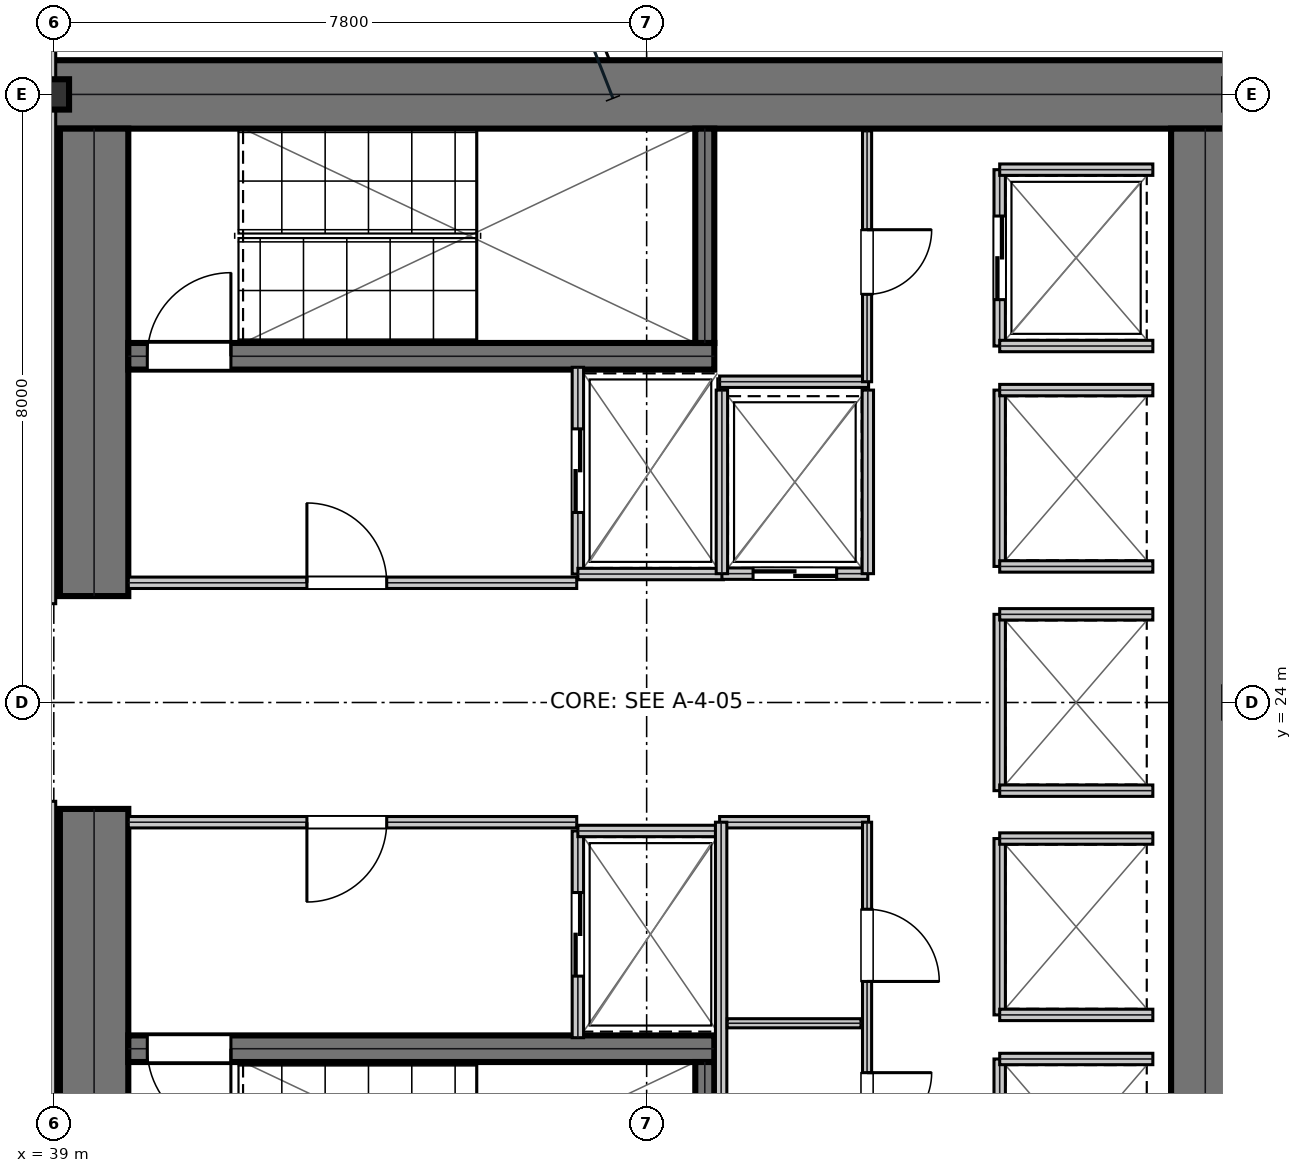
"""IFC4 building model, lengths in metres.
Left out: names, types, materials, properties, quantities, classifications, styles, units other than length and angle.
Written with IfcOpenShell. Run it as: python <this file> out.ifc"""

import sys

from ifc_helpers import new_model, si_unit, direction, frame, frame_2d, origin, origin_2d, place, context, subcontext, project, spatial, rectangle, i_section, extrude, element, fill, save


model = new_model("IFC4")
c1 = context("Model", 3, precision=1e-05, world=origin(), true_north=direction((0.0, 1.0)))
c2 = subcontext(c1, "Body", "Model", "MODEL_VIEW")
j1 = project(units=[si_unit("LENGTHUNIT", "METRE"), si_unit("PLANEANGLEUNIT", "RADIAN")], contexts=[c1])
p1 = place(None, origin())
s1 = spatial("IfcSite", under=j1, at=p1, CompositionType="ELEMENT")
p2 = place(p1, origin())
s2 = spatial("IfcBuilding", under=s1, at=p2, CompositionType="ELEMENT")
p3 = place(p2, frame((0.0, 0.0, 54.0)))
s3 = spatial("IfcBuildingStorey", under=s2, at=p3, CompositionType="ELEMENT", Elevation=54.0)
p4 = place(p3, frame((38.8, 32.0, 0.0), z_axis=(0.0, 0.0, 1.0), x_axis=(1.0, 0.0, 0.0)))
e1 = element("IfcWall", 1, at=p4, inside=s3, PredefinedType="SHEAR", context=c2, shape_type="SweptSolid", body=[
    extrude(rectangle(XDim=16.0, YDim=0.9, at=frame_2d((8.0, 0.0))), origin(), (0.0, 0.0, 1.0), 3.81),
])
for number, where, z_axis, x_axis in (
    (2, (39.53, 16.45, 0.0), (0.0, 0.0, 1.0), (0.0, 1.0, 0.0)),
    (3, (39.53, 25.4, 0.0), (0.0, 0.0, 1.0), (0.0, 1.0, 0.0)),
):
    element("IfcWall", number, at=place(p3, frame(where, z_axis=z_axis, x_axis=x_axis)), inside=s3, PredefinedType="SHEAR", context=c2, shape_type="SweptSolid", body=[
        extrude(rectangle(XDim=6.15, YDim=0.9, at=frame_2d((3.075, 0.0))), origin(), (0.0, 0.0, 1.0), 3.81),
    ])
p5 = place(p3, frame((54.15, 16.45, 0.0), z_axis=(0.0, 0.0, 1.0), x_axis=(0.0, 1.0, 0.0)))
e4 = element("IfcWall", 4, at=p5, inside=s3, PredefinedType="SHEAR", context=c2, shape_type="SweptSolid", body=[
    extrude(rectangle(XDim=15.1, YDim=0.9, at=frame_2d((7.55, 0.0))), origin(), (0.0, 0.0, 1.0), 3.81),
])
p6 = place(p3, frame((39.98, 28.555, 0.0), z_axis=(0.0, 0.0, 1.0), x_axis=(1.0, 0.0, 0.0)))
e5 = element("IfcWall", 5, at=p6, inside=s3, PredefinedType="SHEAR", context=c2, shape_type="SweptSolid", body=[
    extrude(rectangle(XDim=7.71, YDim=0.35, at=frame_2d((3.855, 0.0))), origin(), (0.0, 0.0, 1.0), 3.81),
])
p7 = place(p6, frame((0.25, 0.0, 0.0)))
e6 = element("IfcOpeningElement", 6, at=p7, cuts=e5, PredefinedType="OPENING", context=c2, shape_type="SweptSolid", body=[
    extrude(rectangle(XDim=1.1, YDim=2.15, at=frame_2d((0.55, 1.075))), frame((0.0, 0.185, 0.0), z_axis=(0.0, -1.0, 0.0), x_axis=(1.0, 0.0, 0.0)), (0.0, 0.0, 1.0), 0.37),
])
p8 = place(p3, frame((39.98, 19.445, 0.0), z_axis=(0.0, 0.0, 1.0), x_axis=(1.0, 0.0, 0.0)))
e7 = element("IfcWall", 7, at=p8, inside=s3, PredefinedType="SHEAR", context=c2, shape_type="SweptSolid", body=[
    extrude(rectangle(XDim=7.71, YDim=0.35, at=frame_2d((3.855, 0.0))), origin(), (0.0, 0.0, 1.0), 3.81),
])
p9 = place(p8, frame((0.25, 0.0, 0.0)))
e8 = element("IfcOpeningElement", 8, at=p9, cuts=e7, PredefinedType="OPENING", context=c2, shape_type="SweptSolid", body=[
    extrude(rectangle(XDim=1.1, YDim=2.15, at=frame_2d((0.55, 1.075))), frame((0.0, 0.185, 0.0), z_axis=(0.0, -1.0, 0.0), x_axis=(1.0, 0.0, 0.0)), (0.0, 0.0, 1.0), 0.37),
])
for number, where, z_axis, x_axis in (
    (9, (47.565, 28.73, 0.0), (0.0, 0.0, 1.0), (0.0, 1.0, 0.0)),
    (10, (47.565, 16.45, 0.0), (0.0, 0.0, 1.0), (0.0, 1.0, 0.0)),
):
    element("IfcWall", number, at=place(p3, frame(where, z_axis=z_axis, x_axis=x_axis)), inside=s3, PredefinedType="SHEAR", context=c2, shape_type="SweptSolid", body=[
        extrude(rectangle(XDim=2.82, YDim=0.25, at=frame_2d((1.41, 0.0))), origin(), (0.0, 0.0, 1.0), 3.81),
    ])
p10 = place(p3, frame((39.0, 32.0, 0.0), z_axis=(0.0, 0.0, 1.0), x_axis=(1.0, 0.0, 0.0)))
e11 = element("IfcColumn", 11, at=p10, inside=s3, PredefinedType="COLUMN", context=c2, shape_type="SweptSolid", body=[
    extrude(i_section(OverallWidth=0.401, OverallDepth=0.399, WebThickness=0.025, FlangeThickness=0.04, at=origin_2d()), origin(), (0.0, 0.0, 1.0), 4.044),
])
p11 = place(p3, frame((39.98, 25.575, 0.0), z_axis=(0.0, 0.0, 1.0), x_axis=(1.0, 0.0, 0.0)))
e12 = element("IfcWall", 12, at=p11, inside=s3, PredefinedType="PARTITIONING", context=c2, shape_type="SweptSolid", body=[
    extrude(rectangle(XDim=5.9, YDim=0.15, at=frame_2d((2.95, 0.0))), origin(), (0.0, 0.0, 1.0), 3.81),
])
p12 = place(p11, frame((2.35, 0.0, 0.0)))
e13 = element("IfcOpeningElement", 13, at=p12, cuts=e12, PredefinedType="OPENING", context=c2, shape_type="SweptSolid", body=[
    extrude(rectangle(XDim=1.05, YDim=2.15, at=frame_2d((0.525, 1.075))), frame((0.0, 0.085, 0.0), z_axis=(0.0, -1.0, 0.0), x_axis=(1.0, 0.0, 0.0)), (0.0, 0.0, 1.0), 0.17),
])
p13 = place(p3, frame((39.98, 22.425, 0.0), z_axis=(0.0, 0.0, 1.0), x_axis=(1.0, 0.0, 0.0)))
e14 = element("IfcWall", 14, at=p13, inside=s3, PredefinedType="PARTITIONING", context=c2, shape_type="SweptSolid", body=[
    extrude(rectangle(XDim=5.9, YDim=0.15, at=frame_2d((2.95, 0.0))), origin(), (0.0, 0.0, 1.0), 3.81),
])
p14 = place(p13, frame((2.35, 0.0, 0.0)))
e15 = element("IfcOpeningElement", 15, at=p14, cuts=e14, PredefinedType="OPENING", context=c2, shape_type="SweptSolid", body=[
    extrude(rectangle(XDim=1.05, YDim=2.15, at=frame_2d((0.525, 1.075))), frame((0.0, 0.085, 0.0), z_axis=(0.0, -1.0, 0.0), x_axis=(1.0, 0.0, 0.0)), (0.0, 0.0, 1.0), 0.17),
])
p15 = place(p3, frame((45.895, 25.69, 0.0), z_axis=(0.0, 0.0, 1.0), x_axis=(0.0, 1.0, 0.0)))
e16 = element("IfcWall", 16, at=p15, inside=s3, PredefinedType="PARTITIONING", context=c2, shape_type="SweptSolid", body=[
    extrude(rectangle(XDim=2.72, YDim=0.15, at=frame_2d((1.36, 0.0))), origin(), (0.0, 0.0, 1.0), 3.81),
])
p16 = place(p15, frame((0.81, 0.0, 0.0)))
e17 = element("IfcOpeningElement", 17, at=p16, cuts=e16, PredefinedType="OPENING", context=c2, shape_type="SweptSolid", body=[
    extrude(rectangle(XDim=1.1, YDim=2.15, at=frame_2d((0.55, 1.075))), frame((0.0, 0.085, 0.0), z_axis=(0.0, -1.0, 0.0), x_axis=(1.0, 0.0, 0.0)), (0.0, 0.0, 1.0), 0.17),
])
p17 = place(p3, frame((45.895, 25.69, 0.0), z_axis=(0.0, 0.0, 1.0), x_axis=(1.0, 0.0, 0.0)))
e18 = element("IfcWall", 18, at=p17, inside=s3, PredefinedType="PARTITIONING", context=c2, shape_type="SweptSolid", body=[
    extrude(rectangle(XDim=1.915, YDim=0.15, at=frame_2d((0.958, 0.0))), origin(), (0.0, 0.0, 1.0), 3.81),
])
p18 = place(p3, frame((45.895, 19.59, 0.0), z_axis=(0.0, 0.0, 1.0), x_axis=(0.0, 1.0, 0.0)))
e19 = element("IfcWall", 19, at=p18, inside=s3, PredefinedType="PARTITIONING", context=c2, shape_type="SweptSolid", body=[
    extrude(rectangle(XDim=2.72, YDim=0.15, at=frame_2d((1.36, 0.0))), origin(), (0.0, 0.0, 1.0), 3.81),
])
p19 = place(p18, frame((0.81, 0.0, 0.0)))
e20 = element("IfcOpeningElement", 20, at=p19, cuts=e19, PredefinedType="OPENING", context=c2, shape_type="SweptSolid", body=[
    extrude(rectangle(XDim=1.1, YDim=2.15, at=frame_2d((0.55, 1.075))), frame((0.0, 0.085, 0.0), z_axis=(0.0, -1.0, 0.0), x_axis=(1.0, 0.0, 0.0)), (0.0, 0.0, 1.0), 0.17),
])
p20 = place(p3, frame((45.895, 22.31, 0.0), z_axis=(0.0, 0.0, 1.0), x_axis=(1.0, 0.0, 0.0)))
e21 = element("IfcWall", 21, at=p20, inside=s3, PredefinedType="PARTITIONING", context=c2, shape_type="SweptSolid", body=[
    extrude(rectangle(XDim=1.915, YDim=0.15, at=frame_2d((0.958, 0.0))), origin(), (0.0, 0.0, 1.0), 3.81),
])
p21 = place(p3, frame((47.79, 25.695, 0.0), z_axis=(0.0, 0.0, 1.0), x_axis=(1.0, 0.0, 0.0)))
e22 = element("IfcWall", 22, at=p21, inside=s3, PredefinedType="PARTITIONING", context=c2, shape_type="SweptSolid", body=[
    extrude(rectangle(XDim=1.92, YDim=0.15, at=frame_2d((0.96, 0.0))), origin(), (0.0, 0.0, 1.0), 3.81),
])
p22 = place(p21, frame((0.41, 0.0, 0.0)))
e23 = element("IfcOpeningElement", 23, at=p22, cuts=e22, PredefinedType="OPENING", context=c2, shape_type="SweptSolid", body=[
    extrude(rectangle(XDim=1.1, YDim=2.15, at=frame_2d((0.55, 1.075))), frame((0.0, 0.085, 0.0), z_axis=(0.0, -1.0, 0.0), x_axis=(1.0, 0.0, 0.0)), (0.0, 0.0, 1.0), 0.17),
])
for number, where, z_axis, x_axis in (
    (24, (47.79, 25.695, 0.0), (0.0, 0.0, 1.0), (0.0, 1.0, 0.0)),
    (25, (49.71, 25.695, 0.0), (0.0, 0.0, 1.0), (0.0, 1.0, 0.0)),
):
    element("IfcWall", number, at=place(p3, frame(where, z_axis=z_axis, x_axis=x_axis)), inside=s3, PredefinedType="PARTITIONING", context=c2, shape_type="SweptSolid", body=[
        extrude(rectangle(XDim=2.415, YDim=0.15, at=frame_2d((1.208, 0.0))), origin(), (0.0, 0.0, 1.0), 3.81),
    ])
p23 = place(p3, frame((51.445, 28.69, 0.0), z_axis=(0.0, 0.0, 1.0), x_axis=(0.0, 1.0, 0.0)))
e26 = element("IfcWall", 26, at=p23, inside=s3, PredefinedType="PARTITIONING", context=c2, shape_type="SweptSolid", body=[
    extrude(rectangle(XDim=2.32, YDim=0.15, at=frame_2d((1.16, 0.0))), origin(), (0.0, 0.0, 1.0), 3.81),
])
p24 = place(p23, frame((0.61, 0.0, 0.0)))
e27 = element("IfcOpeningElement", 27, at=p24, cuts=e26, PredefinedType="OPENING", context=c2, shape_type="SweptSolid", body=[
    extrude(rectangle(XDim=1.1, YDim=2.15, at=frame_2d((0.55, 1.075))), frame((0.0, 0.085, 0.0), z_axis=(0.0, -1.0, 0.0), x_axis=(1.0, 0.0, 0.0)), (0.0, 0.0, 1.0), 0.17),
])
for number, where, z_axis, x_axis in (
    (28, (51.445, 28.69, 0.0), (0.0, 0.0, 1.0), (1.0, 0.0, 0.0)),
    (29, (51.445, 31.01, 0.0), (0.0, 0.0, 1.0), (1.0, 0.0, 0.0)),
):
    element("IfcWall", number, at=place(p3, frame(where, z_axis=z_axis, x_axis=x_axis)), inside=s3, PredefinedType="PARTITIONING", context=c2, shape_type="SweptSolid", body=[
        extrude(rectangle(XDim=2.015, YDim=0.15, at=frame_2d((1.007, 0.0))), origin(), (0.0, 0.0, 1.0), 3.81),
    ])
p25 = place(p3, frame((51.445, 25.79, 0.0), z_axis=(0.0, 0.0, 1.0), x_axis=(0.0, 1.0, 0.0)))
e30 = element("IfcWall", 30, at=p25, inside=s3, PredefinedType="PARTITIONING", context=c2, shape_type="SweptSolid", body=[
    extrude(rectangle(XDim=2.32, YDim=0.15, at=frame_2d((1.16, 0.0))), origin(), (0.0, 0.0, 1.0), 3.81),
])
for number, where, z_axis, x_axis in (
    (31, (51.445, 25.79, 0.0), (0.0, 0.0, 1.0), (1.0, 0.0, 0.0)),
    (32, (51.445, 28.11, 0.0), (0.0, 0.0, 1.0), (1.0, 0.0, 0.0)),
):
    element("IfcWall", number, at=place(p3, frame(where, z_axis=z_axis, x_axis=x_axis)), inside=s3, PredefinedType="PARTITIONING", context=c2, shape_type="SweptSolid", body=[
        extrude(rectangle(XDim=2.015, YDim=0.15, at=frame_2d((1.007, 0.0))), origin(), (0.0, 0.0, 1.0), 3.81),
    ])
p26 = place(p3, frame((51.445, 19.89, 0.0), z_axis=(0.0, 0.0, 1.0), x_axis=(0.0, 1.0, 0.0)))
e33 = element("IfcWall", 33, at=p26, inside=s3, PredefinedType="PARTITIONING", context=c2, shape_type="SweptSolid", body=[
    extrude(rectangle(XDim=2.32, YDim=0.15, at=frame_2d((1.16, 0.0))), origin(), (0.0, 0.0, 1.0), 3.81),
])
for number, where, z_axis, x_axis in (
    (34, (51.445, 19.89, 0.0), (0.0, 0.0, 1.0), (1.0, 0.0, 0.0)),
    (35, (51.445, 22.21, 0.0), (0.0, 0.0, 1.0), (1.0, 0.0, 0.0)),
):
    element("IfcWall", number, at=place(p3, frame(where, z_axis=z_axis, x_axis=x_axis)), inside=s3, PredefinedType="PARTITIONING", context=c2, shape_type="SweptSolid", body=[
        extrude(rectangle(XDim=2.015, YDim=0.15, at=frame_2d((1.007, 0.0))), origin(), (0.0, 0.0, 1.0), 3.81),
    ])
p27 = place(p3, frame((51.445, 22.84, 0.0), z_axis=(0.0, 0.0, 1.0), x_axis=(0.0, 1.0, 0.0)))
e36 = element("IfcWall", 36, at=p27, inside=s3, PredefinedType="PARTITIONING", context=c2, shape_type="SweptSolid", body=[
    extrude(rectangle(XDim=2.32, YDim=0.15, at=frame_2d((1.16, 0.0))), origin(), (0.0, 0.0, 1.0), 3.81),
])
for number, where, z_axis, x_axis in (
    (37, (51.445, 22.84, 0.0), (0.0, 0.0, 1.0), (1.0, 0.0, 0.0)),
    (38, (51.445, 25.16, 0.0), (0.0, 0.0, 1.0), (1.0, 0.0, 0.0)),
):
    element("IfcWall", number, at=place(p3, frame(where, z_axis=z_axis, x_axis=x_axis)), inside=s3, PredefinedType="PARTITIONING", context=c2, shape_type="SweptSolid", body=[
        extrude(rectangle(XDim=2.015, YDim=0.15, at=frame_2d((1.007, 0.0))), origin(), (0.0, 0.0, 1.0), 3.81),
    ])
p28 = place(p3, frame((51.445, 16.99, 0.0), z_axis=(0.0, 0.0, 1.0), x_axis=(0.0, 1.0, 0.0)))
e39 = element("IfcWall", 39, at=p28, inside=s3, PredefinedType="PARTITIONING", context=c2, shape_type="SweptSolid", body=[
    extrude(rectangle(XDim=2.32, YDim=0.15, at=frame_2d((1.16, 0.0))), origin(), (0.0, 0.0, 1.0), 3.81),
])
p29 = place(p3, frame((51.445, 19.31, 0.0), z_axis=(0.0, 0.0, 1.0), x_axis=(1.0, 0.0, 0.0)))
e40 = element("IfcWall", 40, at=p29, inside=s3, PredefinedType="PARTITIONING", context=c2, shape_type="SweptSolid", body=[
    extrude(rectangle(XDim=2.015, YDim=0.15, at=frame_2d((1.007, 0.0))), origin(), (0.0, 0.0, 1.0), 3.81),
])
p30 = place(p3, frame((47.76, 22.425, 0.0), z_axis=(0.0, 0.0, 1.0), x_axis=(1.0, 0.0, 0.0)))
e41 = element("IfcWall", 41, at=p30, inside=s3, PredefinedType="PARTITIONING", context=c2, shape_type="SweptSolid", body=[
    extrude(rectangle(XDim=1.96, YDim=0.15, at=frame_2d((0.98, 0.0))), origin(), (0.0, 0.0, 1.0), 3.81),
])
p31 = place(p3, frame((47.78, 16.45, 0.0), z_axis=(0.0, 0.0, 1.0), x_axis=(0.0, 1.0, 0.0)))
e42 = element("IfcWall", 42, at=p31, inside=s3, PredefinedType="PARTITIONING", context=c2, shape_type="SweptSolid", body=[
    extrude(rectangle(XDim=5.975, YDim=0.15, at=frame_2d((2.988, 0.0))), origin(), (0.0, 0.0, 1.0), 3.81),
])
p32 = place(p3, frame((47.86, 19.78, 0.0), z_axis=(0.0, 0.0, 1.0), x_axis=(1.0, 0.0, 0.0)))
e43 = element("IfcWall", 43, at=p32, inside=s3, PredefinedType="PARTITIONING", context=c2, shape_type="SweptSolid", body=[
    extrude(rectangle(XDim=1.76, YDim=0.12, at=frame_2d((0.88, 0.0))), origin(), (0.0, 0.0, 1.0), 3.81),
])
p33 = place(p3, frame((49.7, 16.48, 0.0), z_axis=(0.0, 0.0, 1.0), x_axis=(0.0, 1.0, 0.0)))
e44 = element("IfcWall", 44, at=p33, inside=s3, PredefinedType="PARTITIONING", context=c2, shape_type="SweptSolid", body=[
    extrude(rectangle(XDim=5.945, YDim=0.12, at=frame_2d((2.973, 0.0))), origin(), (0.0, 0.0, 1.0), 3.81),
])
p34 = place(p33, frame((1.8, 0.0, 0.0)))
e45 = element("IfcOpeningElement", 45, at=p34, cuts=e44, PredefinedType="OPENING", context=c2, shape_type="SweptSolid", body=[
    extrude(rectangle(XDim=0.85, YDim=2.15, at=frame_2d((0.425, 1.075))), frame((0.0, 0.07, 0.0), z_axis=(0.0, -1.0, 0.0), x_axis=(1.0, 0.0, 0.0)), (0.0, 0.0, 1.0), 0.14),
])
p35 = place(p33, frame((3.85, 0.0, 0.0)))
e46 = element("IfcOpeningElement", 46, at=p35, cuts=e44, PredefinedType="OPENING", context=c2, shape_type="SweptSolid", body=[
    extrude(rectangle(XDim=0.95, YDim=2.15, at=frame_2d((0.475, 1.075))), frame((0.0, 0.07, 0.0), z_axis=(0.0, -1.0, 0.0), x_axis=(1.0, 0.0, 0.0)), (0.0, 0.0, 1.0), 0.14),
])
p36 = place(p3, frame((47.76, 28.22, 0.0), z_axis=(0.0, 0.0, 1.0), x_axis=(1.0, 0.0, 0.0)))
e47 = element("IfcWall", 47, at=p36, inside=s3, PredefinedType="PARTITIONING", context=c2, shape_type="SweptSolid", body=[
    extrude(rectangle(XDim=1.96, YDim=0.15, at=frame_2d((0.98, 0.0))), origin(), (0.0, 0.0, 1.0), 3.81),
])
p37 = place(p3, frame((49.7, 28.22, 0.0), z_axis=(0.0, 0.0, 1.0), x_axis=(0.0, 1.0, 0.0)))
e48 = element("IfcWall", 48, at=p37, inside=s3, PredefinedType="PARTITIONING", context=c2, shape_type="SweptSolid", body=[
    extrude(rectangle(XDim=3.3, YDim=0.12, at=frame_2d((1.65, 0.0))), origin(), (0.0, 0.0, 1.0), 3.81),
])
p38 = place(p37, frame((1.15, 0.0, 0.0)))
e49 = element("IfcOpeningElement", 49, at=p38, cuts=e48, PredefinedType="OPENING", context=c2, shape_type="SweptSolid", body=[
    extrude(rectangle(XDim=0.85, YDim=2.15, at=frame_2d((0.425, 1.075))), frame((0.0, 0.07, 0.0), z_axis=(0.0, -1.0, 0.0), x_axis=(1.0, 0.0, 0.0)), (0.0, 0.0, 1.0), 0.14),
])
for number, where, z_axis, x_axis in (
    (50, (38.95, 14.5, 0.0), (0.0, 0.0, 1.0), (0.0, 1.0, 0.0)),
    (51, (38.95, 25.3, 0.0), (0.0, 0.0, 1.0), (0.0, 1.0, 0.0)),
):
    element("IfcWall", number, at=place(p3, frame(where, z_axis=z_axis, x_axis=x_axis)), inside=s3, PredefinedType="PARTITIONING", context=c2, shape_type="SweptSolid", body=[
        extrude(rectangle(XDim=8.2, YDim=0.15, at=frame_2d((4.1, 0.0))), origin(), (0.0, 0.0, 1.0), 3.181),
    ])
p39 = place(p12, origin())
e52 = element("IfcDoor", 52, at=p39, inside=s3, OperationType="SINGLE_SWING_LEFT", PredefinedType="DOOR", context=c2, shape_type="SweptSolid", body=[
    extrude(rectangle(XDim=1.05, YDim=2.15, at=frame_2d((0.525, 1.075))), frame((0.0, 0.025, 0.0), z_axis=(0.0, -1.0, 0.0), x_axis=(1.0, 0.0, 0.0)), (0.0, 0.0, 1.0), 0.05),
])
fill(e13, e52)
p40 = place(p14, frame((1.05, 0.0, 0.0), z_axis=(0.0, 0.0, 1.0), x_axis=(-1.0, 0.0, 0.0)))
e53 = element("IfcDoor", 53, at=p40, inside=s3, OperationType="SINGLE_SWING_RIGHT", PredefinedType="DOOR", context=c2, shape_type="SweptSolid", body=[
    extrude(rectangle(XDim=1.05, YDim=2.15, at=frame_2d((0.525, 1.075))), frame((0.0, 0.025, 0.0), z_axis=(0.0, -1.0, 0.0), x_axis=(1.0, 0.0, 0.0)), (0.0, 0.0, 1.0), 0.05),
])
fill(e15, e53)
p41 = place(p16, frame((1.1, 0.0, 0.0), z_axis=(0.0, 0.0, 1.0), x_axis=(-1.0, 0.0, 0.0)))
e54 = element("IfcDoor", 54, at=p41, inside=s3, OperationType="DOUBLE_DOOR_SLIDING", PredefinedType="DOOR", context=c2, shape_type="SweptSolid", body=[
    extrude(rectangle(XDim=1.1, YDim=2.15, at=frame_2d((0.55, 1.075))), frame((0.0, 0.025, 0.0), z_axis=(0.0, -1.0, 0.0), x_axis=(1.0, 0.0, 0.0)), (0.0, 0.0, 1.0), 0.05),
])
fill(e17, e54)
p42 = place(p19, frame((1.1, 0.0, 0.0), z_axis=(0.0, 0.0, 1.0), x_axis=(-1.0, 0.0, 0.0)))
e55 = element("IfcDoor", 55, at=p42, inside=s3, OperationType="DOUBLE_DOOR_SLIDING", PredefinedType="DOOR", context=c2, shape_type="SweptSolid", body=[
    extrude(rectangle(XDim=1.1, YDim=2.15, at=frame_2d((0.55, 1.075))), frame((0.0, 0.025, 0.0), z_axis=(0.0, -1.0, 0.0), x_axis=(1.0, 0.0, 0.0)), (0.0, 0.0, 1.0), 0.05),
])
fill(e20, e55)
p43 = place(p22, frame((1.1, 0.0, 0.0), z_axis=(0.0, 0.0, 1.0), x_axis=(-1.0, 0.0, 0.0)))
e56 = element("IfcDoor", 56, at=p43, inside=s3, OperationType="DOUBLE_DOOR_SLIDING", PredefinedType="DOOR", context=c2, shape_type="SweptSolid", body=[
    extrude(rectangle(XDim=1.1, YDim=2.15, at=frame_2d((0.55, 1.075))), frame((0.0, 0.025, 0.0), z_axis=(0.0, -1.0, 0.0), x_axis=(1.0, 0.0, 0.0)), (0.0, 0.0, 1.0), 0.05),
])
fill(e23, e56)
p44 = place(p24, frame((1.1, 0.0, 0.0), z_axis=(0.0, 0.0, 1.0), x_axis=(-1.0, 0.0, 0.0)))
e57 = element("IfcDoor", 57, at=p44, inside=s3, OperationType="DOUBLE_DOOR_SLIDING", PredefinedType="DOOR", context=c2, shape_type="SweptSolid", body=[
    extrude(rectangle(XDim=1.1, YDim=2.15, at=frame_2d((0.55, 1.075))), frame((0.0, 0.025, 0.0), z_axis=(0.0, -1.0, 0.0), x_axis=(1.0, 0.0, 0.0)), (0.0, 0.0, 1.0), 0.05),
])
fill(e27, e57)
p45 = place(p34, frame((0.85, 0.0, 0.0), z_axis=(0.0, 0.0, 1.0), x_axis=(-1.0, 0.0, 0.0)))
e58 = element("IfcDoor", 58, at=p45, inside=s3, OperationType="SINGLE_SWING_LEFT", PredefinedType="DOOR", context=c2, shape_type="SweptSolid", body=[
    extrude(rectangle(XDim=0.85, YDim=2.15, at=frame_2d((0.425, 1.075))), frame((0.0, 0.025, 0.0), z_axis=(0.0, -1.0, 0.0), x_axis=(1.0, 0.0, 0.0)), (0.0, 0.0, 1.0), 0.05),
])
fill(e45, e58)
p46 = place(p35, frame((0.95, 0.0, 0.0), z_axis=(0.0, 0.0, 1.0), x_axis=(-1.0, 0.0, 0.0)))
e59 = element("IfcDoor", 59, at=p46, inside=s3, OperationType="SINGLE_SWING_RIGHT", PredefinedType="DOOR", context=c2, shape_type="SweptSolid", body=[
    extrude(rectangle(XDim=0.95, YDim=2.15, at=frame_2d((0.475, 1.075))), frame((0.0, 0.025, 0.0), z_axis=(0.0, -1.0, 0.0), x_axis=(1.0, 0.0, 0.0)), (0.0, 0.0, 1.0), 0.05),
])
fill(e46, e59)
p47 = place(p38, frame((0.85, 0.0, 0.0), z_axis=(0.0, 0.0, 1.0), x_axis=(-1.0, 0.0, 0.0)))
e60 = element("IfcDoor", 60, at=p47, inside=s3, OperationType="SINGLE_SWING_LEFT", PredefinedType="DOOR", context=c2, shape_type="SweptSolid", body=[
    extrude(rectangle(XDim=0.85, YDim=2.15, at=frame_2d((0.425, 1.075))), frame((0.0, 0.025, 0.0), z_axis=(0.0, -1.0, 0.0), x_axis=(1.0, 0.0, 0.0)), (0.0, 0.0, 1.0), 0.05),
])
fill(e49, e60)
p48 = place(p7, origin())
e61 = element("IfcDoor", 61, at=p48, inside=s3, OperationType="SINGLE_SWING_RIGHT", PredefinedType="DOOR", context=c2, shape_type="SweptSolid", body=[
    extrude(rectangle(XDim=1.1, YDim=2.15, at=frame_2d((0.55, 1.075))), frame((0.0, 0.025, 0.0), z_axis=(0.0, -1.0, 0.0), x_axis=(1.0, 0.0, 0.0)), (0.0, 0.0, 1.0), 0.05),
])
fill(e6, e61)
p49 = place(p9, frame((1.1, 0.0, 0.0), z_axis=(0.0, 0.0, 1.0), x_axis=(-1.0, 0.0, 0.0)))
e62 = element("IfcDoor", 62, at=p49, inside=s3, OperationType="SINGLE_SWING_LEFT", PredefinedType="DOOR", context=c2, shape_type="SweptSolid", body=[
    extrude(rectangle(XDim=1.1, YDim=2.15, at=frame_2d((0.55, 1.075))), frame((0.0, 0.025, 0.0), z_axis=(0.0, -1.0, 0.0), x_axis=(1.0, 0.0, 0.0)), (0.0, 0.0, 1.0), 0.05),
])
fill(e8, e62)
save(model, sys.argv[1])
